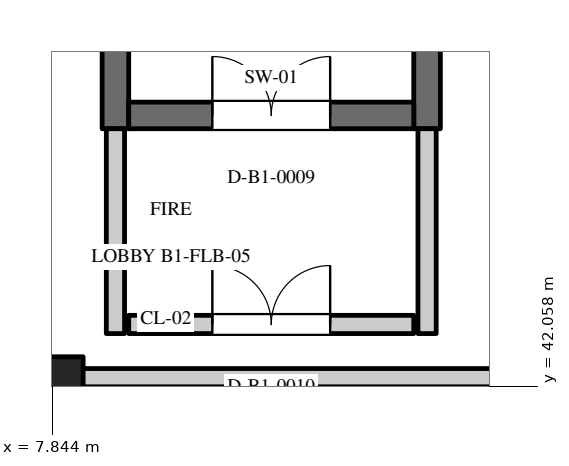
"""IFC4 building model, lengths in metres.
Left out: names, types, materials, properties, quantities, classifications, styles, units other than length and angle.
Written with IfcOpenShell. Run it as: python <this file> out.ifc"""

import sys

from ifc_helpers import new_model, si_unit, direction, frame, frame_2d, origin, origin_2d, place, context, subcontext, project, spatial, rectangle, extrude, element, fill, save


model = new_model("IFC4")
c1 = context("Model", 3, precision=1e-05, world=origin(), true_north=direction((0.0, 1.0)))
c2 = subcontext(c1, "Body", "Model", "MODEL_VIEW")
j1 = project(units=[si_unit("LENGTHUNIT", "METRE"), si_unit("PLANEANGLEUNIT", "RADIAN")], contexts=[c1])
p1 = place(None, origin())
s1 = spatial("IfcSite", under=j1, at=p1, CompositionType="ELEMENT")
p2 = place(p1, origin())
s2 = spatial("IfcBuilding", under=s1, at=p2, CompositionType="ELEMENT")
p3 = place(p2, frame((0.0, 0.0, -4.5)))
s3 = spatial("IfcBuildingStorey", under=s2, at=p3, CompositionType="ELEMENT", Elevation=-4.5)
p4 = place(p3, frame((7.8, 42.0, 0.0), z_axis=(0.0, 0.0, 1.0), x_axis=(1.0, 0.0, 0.0)))
e1 = element("IfcColumn", 1, at=p4, inside=s3, PredefinedType="COLUMN", context=c2, shape_type="SweptSolid", body=[
    extrude(rectangle(XDim=0.9, YDim=0.9, at=origin_2d()), origin(), (0.0, 0.0, 1.0), 4.5),
])
for number, where, z_axis, x_axis in (
    (2, (8.675, 45.45, 0.0), (0.0, 0.0, 1.0), (0.0, 1.0, 0.0)),
    (3, (12.775, 45.45, 0.0), (0.0, 0.0, 1.0), (0.0, 1.0, 0.0)),
):
    element("IfcWall", number, at=place(p3, frame(where, z_axis=z_axis, x_axis=x_axis)), inside=s3, PredefinedType="SHEAR", context=c2, shape_type="SweptSolid", body=[
        extrude(rectangle(XDim=10.5, YDim=0.35, at=frame_2d((5.25, 0.0))), origin(), (0.0, 0.0, 1.0), 4.5),
    ])
p5 = place(p3, frame((8.85, 45.625, 0.0), z_axis=(0.0, 0.0, 1.0), x_axis=(1.0, 0.0, 0.0)))
e4 = element("IfcWall", 4, at=p5, inside=s3, PredefinedType="SHEAR", context=c2, shape_type="SweptSolid", body=[
    extrude(rectangle(XDim=3.75, YDim=0.35, at=frame_2d((1.875, 0.0))), origin(), (0.0, 0.0, 1.0), 4.15),
])
p6 = place(p5, frame((1.1, 0.0, 0.0)))
e5 = element("IfcOpeningElement", 5, at=p6, cuts=e4, PredefinedType="OPENING", context=c2, shape_type="SweptSolid", body=[
    extrude(rectangle(XDim=1.55, YDim=2.25, at=frame_2d((0.775, 1.125))), frame((0.0, 0.187, 0.0), z_axis=(0.0, -1.0, 0.0), x_axis=(1.0, 0.0, 0.0)), (0.0, 0.0, 1.0), 0.374),
])
for number, where, z_axis, x_axis in (
    (6, (8.675, 42.755, 0.0), (0.0, 0.0, 1.0), (0.0, 1.0, 0.0)),
    (7, (12.775, 42.755, 0.0), (0.0, 0.0, 1.0), (0.0, 1.0, 0.0)),
):
    element("IfcWall", number, at=place(p3, frame(where, z_axis=z_axis, x_axis=x_axis)), inside=s3, PredefinedType="STANDARD", context=c2, shape_type="SweptSolid", body=[
        extrude(rectangle(XDim=2.695, YDim=0.24, at=frame_2d((1.348, 0.0))), origin(), (0.0, 0.0, 1.0), 4.15),
    ])
p7 = place(p3, frame((8.85, 42.875, 0.0), z_axis=(0.0, 0.0, 1.0), x_axis=(1.0, 0.0, 0.0)))
e8 = element("IfcWall", 8, at=p7, inside=s3, PredefinedType="STANDARD", context=c2, shape_type="SweptSolid", body=[
    extrude(rectangle(XDim=3.75, YDim=0.24, at=frame_2d((1.875, 0.0))), origin(), (0.0, 0.0, 1.0), 4.15),
])
p8 = place(p7, frame((1.1, 0.0, 0.0)))
e9 = element("IfcOpeningElement", 9, at=p8, cuts=e8, PredefinedType="OPENING", context=c2, shape_type="SweptSolid", body=[
    extrude(rectangle(XDim=1.55, YDim=2.25, at=frame_2d((0.775, 1.125))), frame((0.0, 0.132, 0.0), z_axis=(0.0, -1.0, 0.0), x_axis=(1.0, 0.0, 0.0)), (0.0, 0.0, 1.0), 0.264),
])
p9 = place(p3, frame((0.11, 42.175, 0.0), z_axis=(0.0, 0.0, 1.0), x_axis=(1.0, 0.0, 0.0)))
e10 = element("IfcWall", 10, at=p9, inside=s3, PredefinedType="STANDARD", context=c2, shape_type="SweptSolid", body=[
    extrude(rectangle(XDim=23.18, YDim=0.24, at=frame_2d((11.59, 0.0))), origin(), (0.0, 0.0, 1.0), 4.13),
])
p10 = place(p9, frame((2.692, 0.0, 0.0)))
e11 = element("IfcOpeningElement", 11, at=p10, cuts=e10, PredefinedType="OPENING", context=c2, shape_type="SweptSolid", body=[
    extrude(rectangle(XDim=1.05, YDim=2.1, at=frame_2d((0.525, 1.05))), frame((0.0, 0.132, 0.0), z_axis=(0.0, -1.0, 0.0), x_axis=(1.0, 0.0, 0.0)), (0.0, 0.0, 1.0), 0.264),
])
p11 = place(p6, origin())
e12 = element("IfcDoor", 12, at=p11, inside=s3, OperationType="DOUBLE_DOOR_SINGLE_SWING", PredefinedType="DOOR", context=c2, shape_type="SweptSolid", body=[
    extrude(rectangle(XDim=1.55, YDim=2.25, at=frame_2d((0.775, 1.125))), frame((0.0, 0.025, 0.0), z_axis=(0.0, -1.0, 0.0), x_axis=(1.0, 0.0, 0.0)), (0.0, 0.0, 1.0), 0.05),
])
fill(e5, e12)
p12 = place(p8, origin())
e13 = element("IfcDoor", 13, at=p12, inside=s3, OperationType="DOUBLE_DOOR_SINGLE_SWING", PredefinedType="DOOR", context=c2, shape_type="SweptSolid", body=[
    extrude(rectangle(XDim=1.55, YDim=2.25, at=frame_2d((0.775, 1.125))), frame((0.0, 0.025, 0.0), z_axis=(0.0, -1.0, 0.0), x_axis=(1.0, 0.0, 0.0)), (0.0, 0.0, 1.0), 0.05),
])
fill(e9, e13)
save(model, sys.argv[1])
